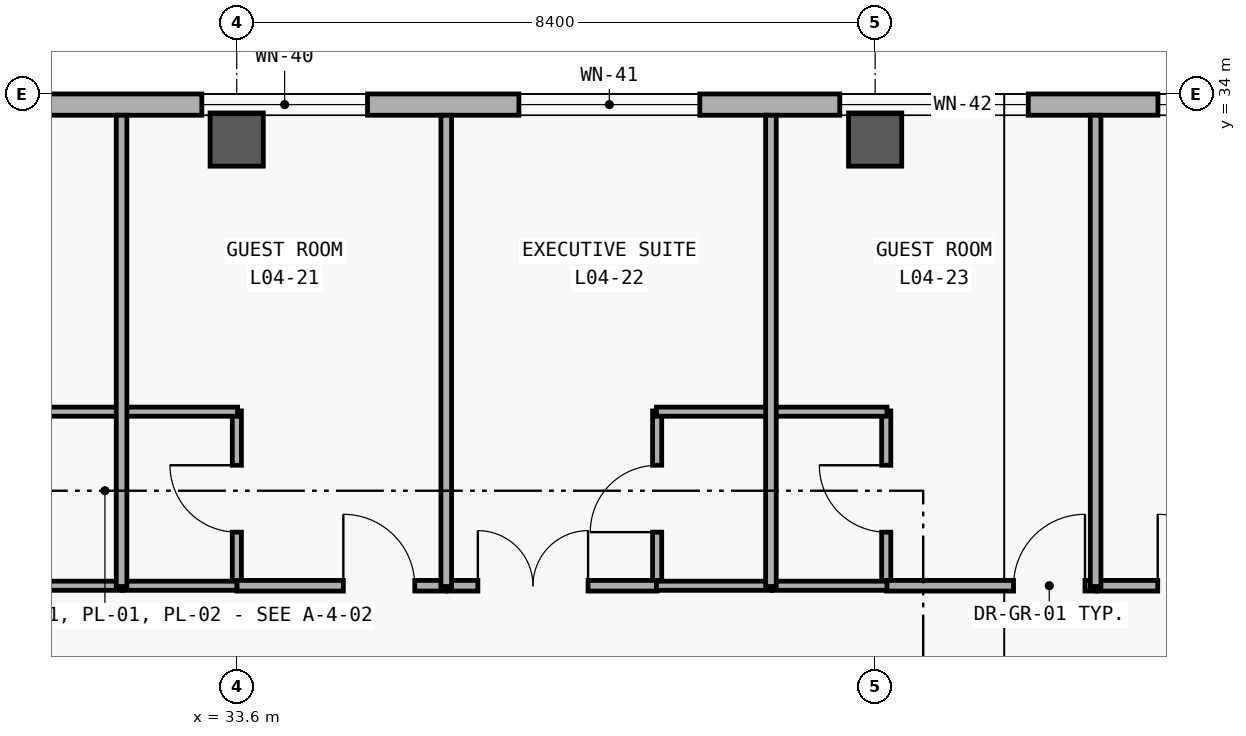
"""IFC4 building model, lengths in metres.
Left out: names, types, materials, properties, quantities, classifications, styles, units other than length and angle.
Written with IfcOpenShell. Run it as: python <this file> out.ifc"""

import sys

from ifc_helpers import new_model, si_unit, direction, frame, frame_2d, origin, origin_2d, place, context, subcontext, project, spatial, rectangle, extrude, element, fill, save


model = new_model("IFC4")
c1 = context("Model", 3, precision=1e-05, world=origin(), true_north=direction((0.0, 1.0)))
c2 = subcontext(c1, "Body", "Model", "MODEL_VIEW")
j1 = project(units=[si_unit("LENGTHUNIT", "METRE"), si_unit("PLANEANGLEUNIT", "RADIAN")], contexts=[c1])
p1 = place(None, origin())
s1 = spatial("IfcSite", under=j1, at=p1, CompositionType="ELEMENT")
p2 = place(p1, origin())
s2 = spatial("IfcBuilding", under=s1, at=p2, CompositionType="ELEMENT")
p3 = place(p2, frame((0.0, 0.0, 19.2)))
s3 = spatial("IfcBuildingStorey", under=s2, at=p3, CompositionType="ELEMENT", Elevation=19.2)
for number, where, z_axis, x_axis in (
    (1, (33.6, 33.4, 0.0), (0.0, 0.0, 1.0), (1.0, 0.0, 0.0)),
    (2, (42.0, 33.4, 0.0), (0.0, 0.0, 1.0), (1.0, 0.0, 0.0)),
):
    element("IfcColumn", number, at=place(p3, frame(where, z_axis=z_axis, x_axis=x_axis)), inside=s3, PredefinedType="COLUMN", context=c2, shape_type="SweptSolid", body=[
        extrude(rectangle(XDim=0.7, YDim=0.7, at=origin_2d()), origin(), (0.0, 0.0, 1.0), 3.6),
    ])
p4 = place(p3, frame((8.68, 33.86, 0.0), z_axis=(0.0, 0.0, 1.0), x_axis=(1.0, 0.0, 0.0)))
e3 = element("IfcWall", 3, at=p4, inside=s3, PredefinedType="SOLIDWALL", context=c2, shape_type="SweptSolid", body=[
    extrude(rectangle(XDim=83.44, YDim=0.28, at=frame_2d((41.72, 0.0))), origin(), (0.0, 0.0, 1.0), 3.32),
])
p5 = place(p4, frame((4.745, 0.0, 0.85)))
e4 = element("IfcOpeningElement", 4, at=p5, cuts=e3, PredefinedType="OPENING", context=c2, shape_type="SweptSolid", body=[
    extrude(rectangle(XDim=1.25, YDim=1.45, at=frame_2d((0.625, 0.725))), frame((0.0, 0.15, 0.0), z_axis=(0.0, -1.0, 0.0), x_axis=(1.0, 0.0, 0.0)), (0.0, 0.0, 1.0), 0.3),
])
p6 = place(p4, frame((11.846, 0.0, 0.85)))
e5 = element("IfcOpeningElement", 5, at=p6, cuts=e3, PredefinedType="OPENING", context=c2, shape_type="SweptSolid", body=[
    extrude(rectangle(XDim=1.78, YDim=1.95, at=frame_2d((0.89, 0.975))), frame((0.0, 0.15, 0.0), z_axis=(0.0, -1.0, 0.0), x_axis=(1.0, 0.0, 0.0)), (0.0, 0.0, 1.0), 0.3),
])
p7 = place(p4, frame((16.068, 0.0, 0.85)))
e6 = element("IfcOpeningElement", 6, at=p7, cuts=e3, PredefinedType="OPENING", context=c2, shape_type="SweptSolid", body=[
    extrude(rectangle(XDim=1.88, YDim=1.95, at=frame_2d((0.94, 0.975))), frame((0.0, 0.15, 0.0), z_axis=(0.0, -1.0, 0.0), x_axis=(1.0, 0.0, 0.0)), (0.0, 0.0, 1.0), 0.3),
])
p8 = place(p4, frame((20.255, 0.0, 0.85)))
e7 = element("IfcOpeningElement", 7, at=p8, cuts=e3, PredefinedType="OPENING", context=c2, shape_type="SweptSolid", body=[
    extrude(rectangle(XDim=2.05, YDim=1.95, at=frame_2d((1.025, 0.975))), frame((0.0, 0.15, 0.0), z_axis=(0.0, -1.0, 0.0), x_axis=(1.0, 0.0, 0.0)), (0.0, 0.0, 1.0), 0.3),
])
p9 = place(p4, frame((24.461, 0.0, 0.85)))
e8 = element("IfcOpeningElement", 8, at=p9, cuts=e3, PredefinedType="OPENING", context=c2, shape_type="SweptSolid", body=[
    extrude(rectangle(XDim=2.18, YDim=1.95, at=frame_2d((1.09, 0.975))), frame((0.0, 0.15, 0.0), z_axis=(0.0, -1.0, 0.0), x_axis=(1.0, 0.0, 0.0)), (0.0, 0.0, 1.0), 0.3),
])
p10 = place(p4, frame((28.633, 0.0, 0.85)))
e9 = element("IfcOpeningElement", 9, at=p10, cuts=e3, PredefinedType="OPENING", context=c2, shape_type="SweptSolid", body=[
    extrude(rectangle(XDim=2.38, YDim=1.95, at=frame_2d((1.19, 0.975))), frame((0.0, 0.15, 0.0), z_axis=(0.0, -1.0, 0.0), x_axis=(1.0, 0.0, 0.0)), (0.0, 0.0, 1.0), 0.3),
])
p11 = place(p4, frame((32.855, 0.0, 0.85)))
e10 = element("IfcOpeningElement", 10, at=p11, cuts=e3, PredefinedType="OPENING", context=c2, shape_type="SweptSolid", body=[
    extrude(rectangle(XDim=2.48, YDim=2.0, at=frame_2d((1.24, 1.0))), frame((0.0, 0.15, 0.0), z_axis=(0.0, -1.0, 0.0), x_axis=(1.0, 0.0, 0.0)), (0.0, 0.0, 1.0), 0.3),
])
p12 = place(p4, frame((37.041, 0.0, 0.85)))
e11 = element("IfcOpeningElement", 11, at=p12, cuts=e3, PredefinedType="OPENING", context=c2, shape_type="SweptSolid", body=[
    extrude(rectangle(XDim=2.65, YDim=2.0, at=frame_2d((1.325, 1.0))), frame((0.0, 0.15, 0.0), z_axis=(0.0, -1.0, 0.0), x_axis=(1.0, 0.0, 0.0)), (0.0, 0.0, 1.0), 0.3),
])
p13 = place(p4, frame((41.163, 0.0, 0.85)))
e12 = element("IfcOpeningElement", 12, at=p13, cuts=e3, PredefinedType="OPENING", context=c2, shape_type="SweptSolid", body=[
    extrude(rectangle(XDim=2.95, YDim=2.05, at=frame_2d((1.475, 1.025))), frame((0.0, 0.15, 0.0), z_axis=(0.0, -1.0, 0.0), x_axis=(1.0, 0.0, 0.0)), (0.0, 0.0, 1.0), 0.3),
])
p14 = place(p4, frame((45.21, 0.0, 0.85)))
e13 = element("IfcOpeningElement", 13, at=p14, cuts=e3, PredefinedType="OPENING", context=c2, shape_type="SweptSolid", body=[
    extrude(rectangle(XDim=3.4, YDim=2.1, at=frame_2d((1.7, 1.05))), frame((0.0, 0.15, 0.0), z_axis=(0.0, -1.0, 0.0), x_axis=(1.0, 0.0, 0.0)), (0.0, 0.0, 1.0), 0.3),
])
p15 = place(p4, frame((50.282, 0.0, 0.85)))
e14 = element("IfcOpeningElement", 14, at=p15, cuts=e3, PredefinedType="OPENING", context=c2, shape_type="SweptSolid", body=[
    extrude(rectangle(XDim=1.8, YDim=1.8, at=frame_2d((0.9, 0.9))), frame((0.0, 0.15, 0.0), z_axis=(0.0, -1.0, 0.0), x_axis=(1.0, 0.0, 0.0)), (0.0, 0.0, 1.0), 0.3),
])
p16 = place(p4, frame((54.404, 0.0, 0.85)))
e15 = element("IfcOpeningElement", 15, at=p16, cuts=e3, PredefinedType="OPENING", context=c2, shape_type="SweptSolid", body=[
    extrude(rectangle(XDim=2.1, YDim=1.8, at=frame_2d((1.05, 0.9))), frame((0.0, 0.15, 0.0), z_axis=(0.0, -1.0, 0.0), x_axis=(1.0, 0.0, 0.0)), (0.0, 0.0, 1.0), 0.3),
])
p17 = place(p4, frame((58.525, 0.0, 0.85)))
e16 = element("IfcOpeningElement", 16, at=p17, cuts=e3, PredefinedType="OPENING", context=c2, shape_type="SweptSolid", body=[
    extrude(rectangle(XDim=2.4, YDim=1.8, at=frame_2d((1.2, 0.9))), frame((0.0, 0.15, 0.0), z_axis=(0.0, -1.0, 0.0), x_axis=(1.0, 0.0, 0.0)), (0.0, 0.0, 1.0), 0.3),
])
p18 = place(p4, frame((62.647, 0.0, 0.85)))
e17 = element("IfcOpeningElement", 17, at=p18, cuts=e3, PredefinedType="OPENING", context=c2, shape_type="SweptSolid", body=[
    extrude(rectangle(XDim=2.7, YDim=1.85, at=frame_2d((1.35, 0.925))), frame((0.0, 0.15, 0.0), z_axis=(0.0, -1.0, 0.0), x_axis=(1.0, 0.0, 0.0)), (0.0, 0.0, 1.0), 0.3),
])
p19 = place(p4, frame((66.769, 0.0, 0.85)))
e18 = element("IfcOpeningElement", 18, at=p19, cuts=e3, PredefinedType="OPENING", context=c2, shape_type="SweptSolid", body=[
    extrude(rectangle(XDim=3.0, YDim=1.9, at=frame_2d((1.5, 0.95))), frame((0.0, 0.15, 0.0), z_axis=(0.0, -1.0, 0.0), x_axis=(1.0, 0.0, 0.0)), (0.0, 0.0, 1.0), 0.3),
])
p20 = place(p4, frame((71.791, 0.0, 0.85)))
e19 = element("IfcOpeningElement", 19, at=p20, cuts=e3, PredefinedType="OPENING", context=c2, shape_type="SweptSolid", body=[
    extrude(rectangle(XDim=1.5, YDim=1.75, at=frame_2d((0.75, 0.875))), frame((0.0, 0.15, 0.0), z_axis=(0.0, -1.0, 0.0), x_axis=(1.0, 0.0, 0.0)), (0.0, 0.0, 1.0), 0.3),
])
p21 = place(p4, frame((75.987, 0.0, 0.85)))
e20 = element("IfcOpeningElement", 20, at=p21, cuts=e3, PredefinedType="OPENING", context=c2, shape_type="SweptSolid", body=[
    extrude(rectangle(XDim=1.65, YDim=1.75, at=frame_2d((0.825, 0.875))), frame((0.0, 0.15, 0.0), z_axis=(0.0, -1.0, 0.0), x_axis=(1.0, 0.0, 0.0)), (0.0, 0.0, 1.0), 0.3),
])
p22 = place(p4, frame((80.109, 0.0, 0.85)))
e21 = element("IfcOpeningElement", 21, at=p22, cuts=e3, PredefinedType="OPENING", context=c2, shape_type="SweptSolid", body=[
    extrude(rectangle(XDim=1.95, YDim=1.75, at=frame_2d((0.975, 0.875))), frame((0.0, 0.15, 0.0), z_axis=(0.0, -1.0, 0.0), x_axis=(1.0, 0.0, 0.0)), (0.0, 0.0, 1.0), 0.3),
])
p23 = place(p3, frame((33.602, 27.52, 0.0), z_axis=(0.0, 0.0, 1.0), x_axis=(0.0, 1.0, 0.0)))
e22 = element("IfcWall", 22, at=p23, inside=s3, PredefinedType="PARTITIONING", context=c2, shape_type="SweptSolid", body=[
    extrude(rectangle(XDim=2.31, YDim=0.12, at=frame_2d((1.155, 0.0))), origin(), (0.0, 0.0, 1.0), 2.48),
])
p24 = place(p23, frame((0.715, 0.0, 0.0)))
e23 = element("IfcOpeningElement", 23, at=p24, cuts=e22, PredefinedType="OPENING", context=c2, shape_type="SweptSolid", body=[
    extrude(rectangle(XDim=0.88, YDim=2.15, at=frame_2d((0.44, 1.075))), frame((0.0, 0.07, 0.0), z_axis=(0.0, -1.0, 0.0), x_axis=(1.0, 0.0, 0.0)), (0.0, 0.0, 1.0), 0.14),
])
p25 = place(p3, frame((39.132, 27.52, 0.0), z_axis=(0.0, 0.0, 1.0), x_axis=(0.0, 1.0, 0.0)))
e24 = element("IfcWall", 24, at=p25, inside=s3, PredefinedType="PARTITIONING", context=c2, shape_type="SweptSolid", body=[
    extrude(rectangle(XDim=2.31, YDim=0.12, at=frame_2d((1.155, 0.0))), origin(), (0.0, 0.0, 1.0), 2.48),
])
p26 = place(p25, frame((0.715, 0.0, 0.0)))
e25 = element("IfcOpeningElement", 25, at=p26, cuts=e24, PredefinedType="OPENING", context=c2, shape_type="SweptSolid", body=[
    extrude(rectangle(XDim=0.88, YDim=2.15, at=frame_2d((0.44, 1.075))), frame((0.0, 0.07, 0.0), z_axis=(0.0, -1.0, 0.0), x_axis=(1.0, 0.0, 0.0)), (0.0, 0.0, 1.0), 0.14),
])
p27 = place(p3, frame((42.146, 27.52, 0.0), z_axis=(0.0, 0.0, 1.0), x_axis=(0.0, 1.0, 0.0)))
e26 = element("IfcWall", 26, at=p27, inside=s3, PredefinedType="PARTITIONING", context=c2, shape_type="SweptSolid", body=[
    extrude(rectangle(XDim=2.31, YDim=0.12, at=frame_2d((1.155, 0.0))), origin(), (0.0, 0.0, 1.0), 2.48),
])
p28 = place(p27, frame((0.715, 0.0, 0.0)))
e27 = element("IfcOpeningElement", 27, at=p28, cuts=e26, PredefinedType="OPENING", context=c2, shape_type="SweptSolid", body=[
    extrude(rectangle(XDim=0.88, YDim=2.15, at=frame_2d((0.44, 1.075))), frame((0.0, 0.07, 0.0), z_axis=(0.0, -1.0, 0.0), x_axis=(1.0, 0.0, 0.0)), (0.0, 0.0, 1.0), 0.14),
])
p29 = place(p3, frame((33.602, 27.53, 0.0), z_axis=(0.0, 0.0, 1.0), x_axis=(1.0, 0.0, 0.0)))
e28 = element("IfcWall", 28, at=p29, inside=s3, PredefinedType="PARTITIONING", context=c2, shape_type="SweptSolid", body=[
    extrude(rectangle(XDim=2.755, YDim=0.14, at=frame_2d((1.377, 0.0))), origin(), (0.0, 0.0, 1.0), 2.48),
])
p30 = place(p29, frame((1.401, 0.0, 0.0)))
e29 = element("IfcOpeningElement", 29, at=p30, cuts=e28, PredefinedType="OPENING", context=c2, shape_type="SweptSolid", body=[
    extrude(rectangle(XDim=0.94, YDim=2.2, at=frame_2d((0.47, 1.1))), frame((0.0, 0.08, 0.0), z_axis=(0.0, -1.0, 0.0), x_axis=(1.0, 0.0, 0.0)), (0.0, 0.0, 1.0), 0.16),
])
p31 = place(p3, frame((36.377, 27.53, 0.0), z_axis=(0.0, 0.0, 1.0), x_axis=(1.0, 0.0, 0.0)))
e30 = element("IfcWall", 30, at=p31, inside=s3, PredefinedType="PARTITIONING", context=c2, shape_type="SweptSolid", body=[
    extrude(rectangle(XDim=2.755, YDim=0.14, at=frame_2d((1.377, 0.0))), origin(), (0.0, 0.0, 1.0), 2.48),
])
p32 = place(p31, frame((0.396, 0.0, 0.0)))
e31 = element("IfcOpeningElement", 31, at=p32, cuts=e30, PredefinedType="OPENING", context=c2, shape_type="SweptSolid", body=[
    extrude(rectangle(XDim=1.45, YDim=2.3, at=frame_2d((0.725, 1.15))), frame((0.0, 0.08, 0.0), z_axis=(0.0, -1.0, 0.0), x_axis=(1.0, 0.0, 0.0)), (0.0, 0.0, 1.0), 0.16),
])
p33 = place(p3, frame((42.146, 27.53, 0.0), z_axis=(0.0, 0.0, 1.0), x_axis=(1.0, 0.0, 0.0)))
e32 = element("IfcWall", 32, at=p33, inside=s3, PredefinedType="PARTITIONING", context=c2, shape_type="SweptSolid", body=[
    extrude(rectangle(XDim=2.755, YDim=0.14, at=frame_2d((1.377, 0.0))), origin(), (0.0, 0.0, 1.0), 2.48),
])
p34 = place(p33, frame((1.675, 0.0, 0.0)))
e33 = element("IfcOpeningElement", 33, at=p34, cuts=e32, PredefinedType="OPENING", context=c2, shape_type="SweptSolid", body=[
    extrude(rectangle(XDim=0.94, YDim=2.2, at=frame_2d((0.47, 1.1))), frame((0.0, 0.08, 0.0), z_axis=(0.0, -1.0, 0.0), x_axis=(1.0, 0.0, 0.0)), (0.0, 0.0, 1.0), 0.16),
])
p35 = place(p3, frame((44.921, 27.53, 0.0), z_axis=(0.0, 0.0, 1.0), x_axis=(1.0, 0.0, 0.0)))
e34 = element("IfcWall", 34, at=p35, inside=s3, PredefinedType="PARTITIONING", context=c2, shape_type="SweptSolid", body=[
    extrude(rectangle(XDim=2.754, YDim=0.14, at=frame_2d((1.377, 0.0))), origin(), (0.0, 0.0, 1.0), 2.48),
])
p36 = place(p35, frame((0.797, 0.0, 0.0)))
e35 = element("IfcOpeningElement", 35, at=p36, cuts=e34, PredefinedType="OPENING", context=c2, shape_type="SweptSolid", body=[
    extrude(rectangle(XDim=0.94, YDim=2.2, at=frame_2d((0.47, 1.1))), frame((0.0, 0.08, 0.0), z_axis=(0.0, -1.0, 0.0), x_axis=(1.0, 0.0, 0.0)), (0.0, 0.0, 1.0), 0.16),
])
for number, where, z_axis, x_axis in (
    (36, (30.578, 27.53, 0.0), (0.0, 0.0, 1.0), (1.0, 0.0, 0.0)),
    (37, (30.578, 29.82, 0.0), (0.0, 0.0, 1.0), (1.0, 0.0, 0.0)),
):
    element("IfcWall", number, at=place(p3, frame(where, z_axis=z_axis, x_axis=x_axis)), inside=s3, PredefinedType="PARTITIONING", context=c2, shape_type="SweptSolid", body=[
        extrude(rectangle(XDim=1.517, YDim=0.12, at=frame_2d((0.759, 0.0))), origin(), (0.0, 0.0, 1.0), 2.48),
    ])
p37 = place(p3, frame((32.095, 27.53, 0.0), z_axis=(0.0, 0.0, 1.0), x_axis=(1.0, 0.0, 0.0)))
e38 = element("IfcWall", 38, at=p37, inside=s3, PredefinedType="PARTITIONING", context=c2, shape_type="SweptSolid", body=[
    extrude(rectangle(XDim=1.507, YDim=0.12, at=frame_2d((0.753, 0.0))), origin(), (0.0, 0.0, 1.0), 2.48),
])
p38 = place(p3, frame((32.095, 29.82, 0.0), z_axis=(0.0, 0.0, 1.0), x_axis=(1.0, 0.0, 0.0)))
e39 = element("IfcWall", 39, at=p38, inside=s3, PredefinedType="PARTITIONING", context=c2, shape_type="SweptSolid", body=[
    extrude(rectangle(XDim=1.517, YDim=0.12, at=frame_2d((0.759, 0.0))), origin(), (0.0, 0.0, 1.0), 2.48),
])
for number, where, z_axis, x_axis in (
    (40, (39.122, 27.53, 0.0), (0.0, 0.0, 1.0), (1.0, 0.0, 0.0)),
    (41, (39.122, 29.82, 0.0), (0.0, 0.0, 1.0), (1.0, 0.0, 0.0)),
):
    element("IfcWall", number, at=place(p3, frame(where, z_axis=z_axis, x_axis=x_axis)), inside=s3, PredefinedType="PARTITIONING", context=c2, shape_type="SweptSolid", body=[
        extrude(rectangle(XDim=1.517, YDim=0.12, at=frame_2d((0.758, 0.0))), origin(), (0.0, 0.0, 1.0), 2.48),
    ])
for number, where, z_axis, x_axis in (
    (42, (40.639, 27.53, 0.0), (0.0, 0.0, 1.0), (1.0, 0.0, 0.0)),
    (43, (40.639, 29.82, 0.0), (0.0, 0.0, 1.0), (1.0, 0.0, 0.0)),
):
    element("IfcWall", number, at=place(p3, frame(where, z_axis=z_axis, x_axis=x_axis)), inside=s3, PredefinedType="PARTITIONING", context=c2, shape_type="SweptSolid", body=[
        extrude(rectangle(XDim=1.517, YDim=0.12, at=frame_2d((0.759, 0.0))), origin(), (0.0, 0.0, 1.0), 2.48),
    ])
for number, where, z_axis, x_axis in (
    (44, (32.085, 27.52, 0.0), (0.0, 0.0, 1.0), (0.0, 1.0, 0.0)),
    (45, (36.357, 27.52, 0.0), (0.0, 0.0, 1.0), (0.0, 1.0, 0.0)),
    (46, (40.629, 27.52, 0.0), (0.0, 0.0, 1.0), (0.0, 1.0, 0.0)),
    (47, (44.901, 27.52, 0.0), (0.0, 0.0, 1.0), (0.0, 1.0, 0.0)),
):
    element("IfcWall", number, at=place(p3, frame(where, z_axis=z_axis, x_axis=x_axis)), inside=s3, PredefinedType="PARTITIONING", context=c2, shape_type="SweptSolid", body=[
        extrude(rectangle(XDim=6.2, YDim=0.14, at=frame_2d((3.1, 0.0))), origin(), (0.0, 0.0, 1.0), 2.48),
    ])
p39 = place(p9, origin())
e48 = element("IfcWindow", 48, at=p39, inside=s3, PartitioningType="SINGLE_PANEL", PredefinedType="WINDOW", context=c2, shape_type="SweptSolid", body=[
    extrude(rectangle(XDim=2.18, YDim=1.95, at=frame_2d((1.09, 0.975))), frame((0.0, 0.03, 0.0), z_axis=(0.0, -1.0, 0.0), x_axis=(1.0, 0.0, 0.0)), (0.0, 0.0, 1.0), 0.06),
])
fill(e8, e48)
p40 = place(p10, origin())
e49 = element("IfcWindow", 49, at=p40, inside=s3, PartitioningType="SINGLE_PANEL", PredefinedType="WINDOW", context=c2, shape_type="SweptSolid", body=[
    extrude(rectangle(XDim=2.38, YDim=1.95, at=frame_2d((1.19, 0.975))), frame((0.0, 0.03, 0.0), z_axis=(0.0, -1.0, 0.0), x_axis=(1.0, 0.0, 0.0)), (0.0, 0.0, 1.0), 0.06),
])
fill(e9, e49)
p41 = place(p11, origin())
e50 = element("IfcWindow", 50, at=p41, inside=s3, PartitioningType="SINGLE_PANEL", PredefinedType="WINDOW", context=c2, shape_type="SweptSolid", body=[
    extrude(rectangle(XDim=2.48, YDim=2.0, at=frame_2d((1.24, 1.0))), frame((0.0, 0.03, 0.0), z_axis=(0.0, -1.0, 0.0), x_axis=(1.0, 0.0, 0.0)), (0.0, 0.0, 1.0), 0.06),
])
fill(e10, e50)
p42 = place(p12, origin())
e51 = element("IfcWindow", 51, at=p42, inside=s3, PartitioningType="SINGLE_PANEL", PredefinedType="WINDOW", context=c2, shape_type="SweptSolid", body=[
    extrude(rectangle(XDim=2.65, YDim=2.0, at=frame_2d((1.325, 1.0))), frame((0.0, 0.03, 0.0), z_axis=(0.0, -1.0, 0.0), x_axis=(1.0, 0.0, 0.0)), (0.0, 0.0, 1.0), 0.06),
])
fill(e11, e51)
p43 = place(p24, origin())
e52 = element("IfcDoor", 52, at=p43, inside=s3, OperationType="SINGLE_SWING_RIGHT", PredefinedType="DOOR", context=c2, shape_type="SweptSolid", body=[
    extrude(rectangle(XDim=0.88, YDim=2.15, at=frame_2d((0.44, 1.075))), frame((0.0, 0.025, 0.0), z_axis=(0.0, -1.0, 0.0), x_axis=(1.0, 0.0, 0.0)), (0.0, 0.0, 1.0), 0.05),
])
fill(e23, e52)
p44 = place(p26, origin())
e53 = element("IfcDoor", 53, at=p44, inside=s3, OperationType="SINGLE_SWING_LEFT", PredefinedType="DOOR", context=c2, shape_type="SweptSolid", body=[
    extrude(rectangle(XDim=0.88, YDim=2.15, at=frame_2d((0.44, 1.075))), frame((0.0, 0.025, 0.0), z_axis=(0.0, -1.0, 0.0), x_axis=(1.0, 0.0, 0.0)), (0.0, 0.0, 1.0), 0.05),
])
fill(e25, e53)
p45 = place(p28, origin())
e54 = element("IfcDoor", 54, at=p45, inside=s3, OperationType="SINGLE_SWING_RIGHT", PredefinedType="DOOR", context=c2, shape_type="SweptSolid", body=[
    extrude(rectangle(XDim=0.88, YDim=2.15, at=frame_2d((0.44, 1.075))), frame((0.0, 0.025, 0.0), z_axis=(0.0, -1.0, 0.0), x_axis=(1.0, 0.0, 0.0)), (0.0, 0.0, 1.0), 0.05),
])
fill(e27, e54)
p46 = place(p30, origin())
e55 = element("IfcDoor", 55, at=p46, inside=s3, OperationType="SINGLE_SWING_LEFT", PredefinedType="DOOR", context=c2, shape_type="SweptSolid", body=[
    extrude(rectangle(XDim=0.94, YDim=2.2, at=frame_2d((0.47, 1.1))), frame((0.0, 0.025, 0.0), z_axis=(0.0, -1.0, 0.0), x_axis=(1.0, 0.0, 0.0)), (0.0, 0.0, 1.0), 0.05),
])
fill(e29, e55)
p47 = place(p32, origin())
e56 = element("IfcDoor", 56, at=p47, inside=s3, OperationType="DOUBLE_DOOR_SINGLE_SWING", PredefinedType="DOOR", context=c2, shape_type="SweptSolid", body=[
    extrude(rectangle(XDim=1.45, YDim=2.3, at=frame_2d((0.725, 1.15))), frame((0.0, 0.025, 0.0), z_axis=(0.0, -1.0, 0.0), x_axis=(1.0, 0.0, 0.0)), (0.0, 0.0, 1.0), 0.05),
])
fill(e31, e56)
p48 = place(p34, origin())
e57 = element("IfcDoor", 57, at=p48, inside=s3, OperationType="SINGLE_SWING_RIGHT", PredefinedType="DOOR", context=c2, shape_type="SweptSolid", body=[
    extrude(rectangle(XDim=0.94, YDim=2.2, at=frame_2d((0.47, 1.1))), frame((0.0, 0.025, 0.0), z_axis=(0.0, -1.0, 0.0), x_axis=(1.0, 0.0, 0.0)), (0.0, 0.0, 1.0), 0.05),
])
fill(e33, e57)
p49 = place(p36, origin())
e58 = element("IfcDoor", 58, at=p49, inside=s3, OperationType="SINGLE_SWING_LEFT", PredefinedType="DOOR", context=c2, shape_type="SweptSolid", body=[
    extrude(rectangle(XDim=0.94, YDim=2.2, at=frame_2d((0.47, 1.1))), frame((0.0, 0.025, 0.0), z_axis=(0.0, -1.0, 0.0), x_axis=(1.0, 0.0, 0.0)), (0.0, 0.0, 1.0), 0.05),
])
fill(e35, e58)
save(model, sys.argv[1])
